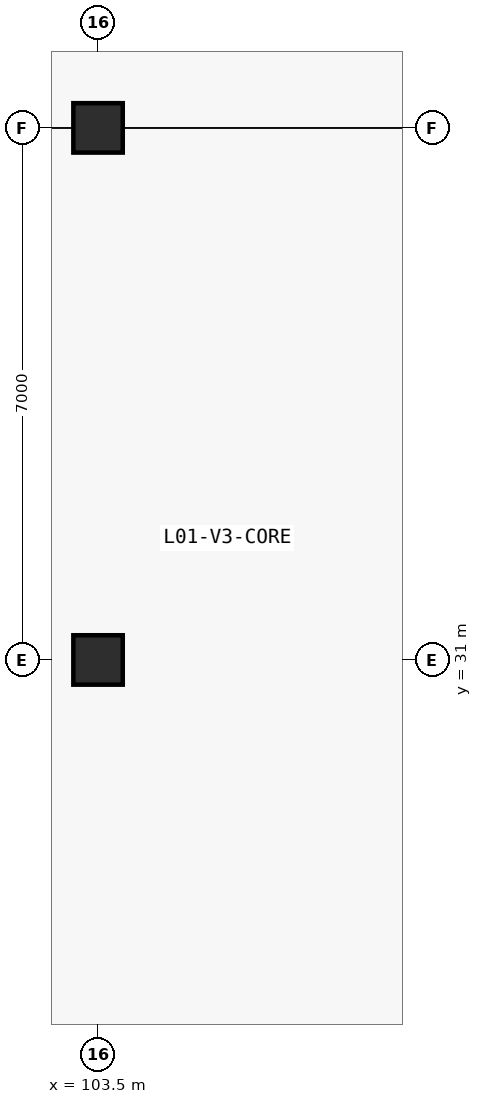
"""IFC4 building model, lengths in metres.
Left out: names, types, materials, properties, quantities, classifications, styles, units other than length and angle.
Written with IfcOpenShell. Run it as: python <this file> out.ifc"""

import sys

from ifc_helpers import new_model, si_unit, direction, frame, origin, origin_2d, place, context, subcontext, project, spatial, rectangle, extrude, element, save


model = new_model("IFC4")
c1 = context("Model", 3, precision=1e-05, world=origin(), true_north=direction((0.0, 1.0)))
c2 = subcontext(c1, "Body", "Model", "MODEL_VIEW")
j1 = project(units=[si_unit("LENGTHUNIT", "METRE"), si_unit("PLANEANGLEUNIT", "RADIAN")], contexts=[c1])
p1 = place(None, origin())
s1 = spatial("IfcSite", under=j1, at=p1, CompositionType="ELEMENT")
p2 = place(p1, origin())
s2 = spatial("IfcBuilding", under=s1, at=p2, CompositionType="ELEMENT")
p3 = place(p2, frame((0.0, 0.0, 4.2)))
s3 = spatial("IfcBuildingStorey", under=s2, at=p3, CompositionType="ELEMENT", Elevation=4.2)
for number, where, z_axis, x_axis in (
    (1, (103.5, 31.0, 0.0), (0.0, 0.0, 1.0), (1.0, 0.0, 0.0)),
    (2, (103.5, 38.0, 0.0), (0.0, 0.0, 1.0), (1.0, 0.0, 0.0)),
):
    element("IfcColumn", number, at=place(p3, frame(where, z_axis=z_axis, x_axis=x_axis)), inside=s3, PredefinedType="COLUMN", context=c2, shape_type="SweptSolid", body=[
        extrude(rectangle(XDim=0.65, YDim=0.65, at=origin_2d()), origin(), (0.0, 0.0, 1.0), 4.2),
    ])
save(model, sys.argv[1])
